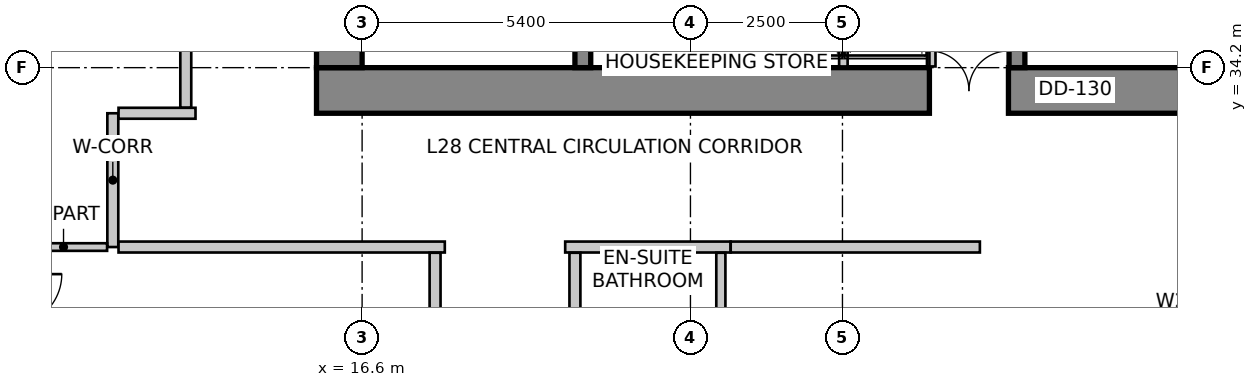
"""IFC4 building model, lengths in metres.
Left out: names, types, materials, properties, quantities, classifications, styles, units other than length and angle.
Written with IfcOpenShell. Run it as: python <this file> out.ifc"""

import sys

from ifc_helpers import new_model, si_unit, direction, frame, frame_2d, origin, place, context, subcontext, project, spatial, rectangle, extrude, source, transform, mapped, element, fill, save


model = new_model("IFC4")
c1 = context("Model", 3, precision=1e-05, world=origin(), true_north=direction((0.0, 1.0)))
c2 = subcontext(c1, "Body", "Model", "MODEL_VIEW")
j1 = project(units=[si_unit("LENGTHUNIT", "METRE"), si_unit("PLANEANGLEUNIT", "RADIAN")], contexts=[c1])
p1 = place(None, origin())
s1 = spatial("IfcSite", under=j1, at=p1, CompositionType="ELEMENT")
p2 = place(p1, origin())
s2 = spatial("IfcBuilding", under=s1, at=p2, CompositionType="ELEMENT")
p3 = place(p2, frame((0.0, 0.0, 117.8)))
s3 = spatial("IfcBuildingStorey", under=s2, at=p3, CompositionType="ELEMENT", Elevation=117.8)
p4 = place(p3, frame((15.85, 33.825, 0.0), z_axis=(0.0, 0.0, 1.0), x_axis=(1.0, 0.0, 0.0)))
e1 = element("IfcWall", 1, at=p4, inside=s3, PredefinedType="SHEAR", context=c2, shape_type="SweptSolid", body=[
    extrude(rectangle(XDim=15.9, YDim=0.75, at=frame_2d((7.95, 0.0))), origin(), (0.0, 0.0, 1.0), 3.6),
])
m1 = source(origin(), c2, "Body", "SweptSolid", [
    extrude(rectangle(XDim=1.3, YDim=2.15, at=frame_2d((0.65, 1.075))), frame((0.0, 0.385, 0.0), z_axis=(0.0, -1.0, 0.0), x_axis=(1.0, 0.0, 0.0)), (0.0, 0.0, 1.0), 0.77),
])
p5 = place(p4, frame((10.08, 0.0, 0.0)))
e2 = element("IfcOpeningElement", 2, at=p5, cuts=e1, PredefinedType="OPENING", context=c2, shape_type="MappedRepresentation", body=[
    mapped(m1, transform((0.0, 0.0, 0.0), scale=1.0)),
])
p6 = place(p3, frame((16.225, 34.2, 0.0), z_axis=(0.0, 0.0, 1.0), x_axis=(0.0, 1.0, 0.0)))
e3 = element("IfcWall", 3, at=p6, inside=s3, PredefinedType="SHEAR", context=c2, shape_type="SweptSolid", body=[
    extrude(rectangle(XDim=11.4, YDim=0.75, at=frame_2d((5.7, 0.0))), origin(), (0.0, 0.0, 1.0), 3.6),
])
m2 = source(origin(), c2, "Body", "SweptSolid", [
    extrude(rectangle(XDim=1.1, YDim=2.15, at=frame_2d((0.55, 1.075))), frame((0.0, 0.385, 0.0), z_axis=(0.0, -1.0, 0.0), x_axis=(1.0, 0.0, 0.0)), (0.0, 0.0, 1.0), 0.77),
])
p7 = place(p6, frame((7.15, 0.0, 0.0)))
e4 = element("IfcOpeningElement", 4, at=p7, cuts=e3, PredefinedType="OPENING", context=c2, shape_type="MappedRepresentation", body=[
    mapped(m2, transform((0.0, 0.0, 0.0), scale=1.0)),
])
p8 = place(p3, frame((20.23, 34.2, 0.0), z_axis=(0.0, 0.0, 1.0), x_axis=(0.0, 1.0, 0.0)))
e5 = element("IfcWall", 5, at=p8, inside=s3, PredefinedType="SHEAR", context=c2, shape_type="SweptSolid", body=[
    extrude(rectangle(XDim=9.06, YDim=0.26, at=frame_2d((4.53, 0.0))), origin(), (0.0, 0.0, 1.0), 3.6),
])
m3 = source(origin(), c2, "Body", "SweptSolid", [
    extrude(rectangle(XDim=1.1, YDim=2.15, at=frame_2d((0.55, 1.075))), frame((0.0, 0.14, 0.0), z_axis=(0.0, -1.0, 0.0), x_axis=(1.0, 0.0, 0.0)), (0.0, 0.0, 1.0), 0.28),
])
p9 = place(p8, frame((7.45, 0.0, 0.0)))
e6 = element("IfcOpeningElement", 6, at=p9, cuts=e5, PredefinedType="OPENING", context=c2, shape_type="MappedRepresentation", body=[
    mapped(m3, transform((0.0, 0.0, 0.0), scale=1.0)),
])
p10 = place(p3, frame((27.37, 34.2, 0.0), z_axis=(0.0, 0.0, 1.0), x_axis=(0.0, 1.0, 0.0)))
e7 = element("IfcWall", 7, at=p10, inside=s3, PredefinedType="SHEAR", context=c2, shape_type="SweptSolid", body=[
    extrude(rectangle(XDim=9.06, YDim=0.26, at=frame_2d((4.53, 0.0))), origin(), (0.0, 0.0, 1.0), 3.6),
])
p11 = place(p10, frame((7.45, 0.0, 0.0)))
e8 = element("IfcOpeningElement", 8, at=p11, cuts=e7, PredefinedType="OPENING", context=c2, shape_type="MappedRepresentation", body=[
    mapped(m3, transform((0.0, 0.0, 0.0), scale=1.0)),
])
p12 = place(p3, frame((28.884, 28.792, 0.0), z_axis=(0.0, 0.0, 1.0), x_axis=(0.707064797706, 0.707148762175, 0.0)))
e9 = element("IfcWall", 9, at=p12, inside=s3, PredefinedType="SOLIDWALL", context=c2, shape_type="SweptSolid", body=[
    extrude(rectangle(XDim=2.908, YDim=0.3, at=frame_2d((1.454, 0.0))), origin(), (0.0, 0.0, 1.0), 3.35),
])
m4 = source(origin(), c2, "Body", "SweptSolid", [
    extrude(rectangle(XDim=1.8, YDim=2.1, at=frame_2d((0.9, 1.05))), frame((0.0, 0.16, 0.0), z_axis=(0.0, -1.0, 0.0), x_axis=(1.0, 0.0, 0.0)), (0.0, 0.0, 1.0), 0.32),
])
p13 = place(p12, frame((0.554, 0.0, 0.85)))
e10 = element("IfcOpeningElement", 10, at=p13, cuts=e9, PredefinedType="OPENING", context=c2, shape_type="MappedRepresentation", body=[
    mapped(m4, transform((0.0, 0.0, 0.0), scale=1.0)),
])
p14 = place(p3, frame((13.269, 47.134, 0.0), z_axis=(0.0, 0.0, 1.0), x_axis=(-0.319929596295, -0.947441319246, 0.0)))
e11 = element("IfcWall", 11, at=p14, inside=s3, PredefinedType="SOLIDWALL", context=c2, shape_type="SweptSolid", body=[
    extrude(rectangle(XDim=16.134, YDim=0.3, at=frame_2d((8.067, 0.0))), origin(), (0.0, 0.0, 1.0), 3.35),
])
m5 = source(origin(), c2, "Body", "SweptSolid", [
    extrude(rectangle(XDim=2.4, YDim=2.2, at=frame_2d((1.2, 1.1))), frame((0.0, 0.16, 0.0), z_axis=(0.0, -1.0, 0.0), x_axis=(1.0, 0.0, 0.0)), (0.0, 0.0, 1.0), 0.32),
])
p15 = place(p14, frame((2.276, 0.0, 0.85)))
e12 = element("IfcOpeningElement", 12, at=p15, cuts=e11, PredefinedType="OPENING", context=c2, shape_type="MappedRepresentation", body=[
    mapped(m5, transform((0.0, 0.0, 0.0), scale=1.0)),
])
m6 = source(origin(), c2, "Body", "SweptSolid", [
    extrude(rectangle(XDim=2.1, YDim=2.0, at=frame_2d((1.05, 1.0))), frame((0.0, 0.16, 0.0), z_axis=(0.0, -1.0, 0.0), x_axis=(1.0, 0.0, 0.0)), (0.0, 0.0, 1.0), 0.32),
])
p16 = place(p14, frame((7.361, 0.0, 0.85)))
e13 = element("IfcOpeningElement", 13, at=p16, cuts=e11, PredefinedType="OPENING", context=c2, shape_type="MappedRepresentation", body=[
    mapped(m6, transform((0.0, 0.0, 0.0), scale=1.0)),
])
p17 = place(p14, frame((12.147, 0.0, 0.85)))
e14 = element("IfcOpeningElement", 14, at=p17, cuts=e11, PredefinedType="OPENING", context=c2, shape_type="MappedRepresentation", body=[
    mapped(m5, transform((0.0, 0.0, 0.0), scale=1.0)),
])
p18 = place(p3, frame((8.185, 31.834, 0.0), z_axis=(0.0, 0.0, 1.0), x_axis=(0.189707113148, -0.981840725994, 0.0)))
e15 = element("IfcWall", 15, at=p18, inside=s3, PredefinedType="SOLIDWALL", context=c2, shape_type="SweptSolid", body=[
    extrude(rectangle(XDim=21.221, YDim=0.3, at=frame_2d((10.611, 0.0))), origin(), (0.0, 0.0, 1.0), 3.35),
])
m7 = source(origin(), c2, "Body", "SweptSolid", [
    extrude(rectangle(XDim=1.6, YDim=2.15, at=frame_2d((0.8, 1.075))), frame((0.0, 0.16, 0.0), z_axis=(0.0, -1.0, 0.0), x_axis=(1.0, 0.0, 0.0)), (0.0, 0.0, 1.0), 0.32),
])
p19 = place(p18, frame((8.441, 0.0, 0.0)))
e16 = element("IfcOpeningElement", 16, at=p19, cuts=e15, PredefinedType="OPENING", context=c2, shape_type="MappedRepresentation", body=[
    mapped(m7, transform((0.0, 0.0, 0.0), scale=1.0)),
])
m8 = source(origin(), c2, "Body", "SweptSolid", [
    extrude(rectangle(XDim=1.2, YDim=1.6, at=frame_2d((0.6, 0.8))), frame((0.0, 0.16, 0.0), z_axis=(0.0, -1.0, 0.0), x_axis=(1.0, 0.0, 0.0)), (0.0, 0.0, 1.0), 0.32),
])
p20 = place(p18, frame((1.127, 0.0, 0.85)))
e17 = element("IfcOpeningElement", 17, at=p20, cuts=e15, PredefinedType="OPENING", context=c2, shape_type="MappedRepresentation", body=[
    mapped(m8, transform((0.0, 0.0, 0.0), scale=1.0)),
])
p21 = place(p18, frame((4.369, 0.0, 0.85)))
e18 = element("IfcOpeningElement", 18, at=p21, cuts=e15, PredefinedType="OPENING", context=c2, shape_type="MappedRepresentation", body=[
    mapped(m6, transform((0.0, 0.0, 0.0), scale=1.0)),
])
p22 = place(p18, frame((12.021, 0.0, 0.85)))
e19 = element("IfcOpeningElement", 19, at=p22, cuts=e15, PredefinedType="OPENING", context=c2, shape_type="MappedRepresentation", body=[
    mapped(m6, transform((0.0, 0.0, 0.0), scale=1.0)),
])
p23 = place(p18, frame((17.091, 0.0, 0.85)))
e20 = element("IfcOpeningElement", 20, at=p23, cuts=e15, PredefinedType="OPENING", context=c2, shape_type="MappedRepresentation", body=[
    mapped(m5, transform((0.0, 0.0, 0.0), scale=1.0)),
])
for number, where, z_axis, x_axis in (
    (21, (25.96, 34.22, 0.0), (0.0, 0.0, 1.0), (0.0, 1.0, 0.0)),
    (22, (23.07, 34.22, 0.0), (0.0, 0.0, 1.0), (0.0, 1.0, 0.0)),
    (23, (24.515, 34.22, 0.0), (0.0, 0.0, 1.0), (0.0, 1.0, 0.0)),
):
    element("IfcWall", number, at=place(p3, frame(where, z_axis=z_axis, x_axis=x_axis)), inside=s3, PredefinedType="SOLIDWALL", context=c2, shape_type="SweptSolid", body=[
        extrude(rectangle(XDim=1.62, YDim=0.14, at=frame_2d((0.81, 0.0))), origin(), (0.0, 0.0, 1.0), 2.642),
    ])
p24 = place(p3, frame((12.5, 31.25, 0.0), z_axis=(0.0, 0.0, 1.0), x_axis=(0.0, 1.0, 0.0)))
e24 = element("IfcWall", 24, at=p24, inside=s3, PredefinedType="PARTITIONING", context=c2, shape_type="SweptSolid", body=[
    extrude(rectangle(XDim=2.2, YDim=0.18, at=frame_2d((1.1, 0.0))), origin(), (0.0, 0.0, 1.0), 3.019),
])
p25 = place(p3, frame((12.594, 33.45, 0.0), z_axis=(0.0, 0.0, 1.0), x_axis=(1.0, 0.0, 0.0)))
e25 = element("IfcWall", 25, at=p25, inside=s3, PredefinedType="PARTITIONING", context=c2, shape_type="SweptSolid", body=[
    extrude(rectangle(XDim=1.266, YDim=0.18, at=frame_2d((0.633, 0.0))), origin(), (0.0, 0.0, 1.0), 3.35),
])
p26 = place(p3, frame((17.96, 31.25, 0.0), z_axis=(0.0, 0.0, 1.0), x_axis=(-1.0, 0.0, 0.0)))
e26 = element("IfcWall", 26, at=p26, inside=s3, PredefinedType="PARTITIONING", context=c2, shape_type="SweptSolid", body=[
    extrude(rectangle(XDim=5.366, YDim=0.18, at=frame_2d((2.683, 0.0))), origin(), (0.0, 0.0, 1.0), 3.019),
])
p27 = place(p3, frame((22.66, 31.25, 0.0), z_axis=(0.0, 0.0, 1.0), x_axis=(-1.0, 0.0, 0.0)))
e27 = element("IfcWall", 27, at=p27, inside=s3, PredefinedType="PARTITIONING", context=c2, shape_type="SweptSolid", body=[
    extrude(rectangle(XDim=2.72, YDim=0.18, at=frame_2d((1.36, 0.0))), origin(), (0.0, 0.0, 1.0), 3.019),
])
p28 = place(p3, frame((26.76, 31.25, 0.0), z_axis=(0.0, 0.0, 1.0), x_axis=(-1.0, 0.0, 0.0)))
e28 = element("IfcWall", 28, at=p28, inside=s3, PredefinedType="PARTITIONING", context=c2, shape_type="SweptSolid", body=[
    extrude(rectangle(XDim=4.098, YDim=0.18, at=frame_2d((2.049, 0.0))), origin(), (0.0, 0.0, 1.0), 3.35),
])
p29 = place(p3, frame((13.7, 33.544, 0.0), z_axis=(0.0, 0.0, 1.0), x_axis=(0.0, 1.0, 0.0)))
e29 = element("IfcWall", 29, at=p29, inside=s3, PredefinedType="PARTITIONING", context=c2, shape_type="SweptSolid", body=[
    extrude(rectangle(XDim=13.86, YDim=0.18, at=frame_2d((6.93, 0.0))), origin(), (0.0, 0.0, 1.0), 2.492),
])
m9 = source(origin(), c2, "Body", "SweptSolid", [
    extrude(rectangle(XDim=0.9, YDim=2.15, at=frame_2d((0.45, 1.075))), frame((0.0, 0.1, 0.0), z_axis=(0.0, -1.0, 0.0), x_axis=(1.0, 0.0, 0.0)), (0.0, 0.0, 1.0), 0.2),
])
p30 = place(p29, frame((4.253, 0.0, 0.0)))
e30 = element("IfcOpeningElement", 30, at=p30, cuts=e29, PredefinedType="OPENING", context=c2, shape_type="MappedRepresentation", body=[
    mapped(m9, transform((0.0, 0.0, 0.0), scale=1.0)),
])
p31 = place(p3, frame((12.406, 31.25, 0.0), z_axis=(0.0, 0.0, 1.0), x_axis=(-1.0, 0.0, 0.0)))
e31 = element("IfcWall", 31, at=p31, inside=s3, PredefinedType="PARTITIONING", context=c2, shape_type="SweptSolid", body=[
    extrude(rectangle(XDim=1.433, YDim=0.125, at=frame_2d((0.717, 0.0))), origin(), (0.0, 0.0, 1.0), 2.492),
])
p32 = place(p3, frame((17.8, 24.162, 0.0), z_axis=(0.0, 0.0, 1.0), x_axis=(0.0, 1.0, 0.0)))
e32 = element("IfcWall", 32, at=p32, inside=s3, PredefinedType="PARTITIONING", context=c2, shape_type="SweptSolid", body=[
    extrude(rectangle(XDim=6.994, YDim=0.18, at=frame_2d((3.497, 0.0))), origin(), (0.0, 0.0, 1.0), 2.803),
])
p33 = place(p32, frame((3.047, 0.0, 0.0)))
e33 = element("IfcOpeningElement", 33, at=p33, cuts=e32, PredefinedType="OPENING", context=c2, shape_type="MappedRepresentation", body=[
    mapped(m9, transform((0.0, 0.0, 0.0), scale=1.0)),
])
p34 = place(p3, frame((20.1, 31.156, 0.0), z_axis=(0.0, 0.0, 1.0), x_axis=(0.0, -1.0, 0.0)))
e34 = element("IfcWall", 34, at=p34, inside=s3, PredefinedType="PARTITIONING", context=c2, shape_type="SweptSolid", body=[
    extrude(rectangle(XDim=2.266, YDim=0.18, at=frame_2d((1.133, 0.0))), origin(), (0.0, 0.0, 1.0), 3.019),
])
p35 = place(p3, frame((22.5, 31.156, 0.0), z_axis=(0.0, 0.0, 1.0), x_axis=(0.0, -1.0, 0.0)))
e35 = element("IfcWall", 35, at=p35, inside=s3, PredefinedType="PARTITIONING", context=c2, shape_type="SweptSolid", body=[
    extrude(rectangle(XDim=2.027, YDim=0.15, at=frame_2d((1.014, 0.0))), origin(), (0.0, 0.0, 1.0), 3.019),
])
m10 = source(origin(), c2, "Body", "SweptSolid", [
    extrude(rectangle(XDim=1.8, YDim=2.1, at=frame_2d((0.9, 1.05))), frame((0.0, -0.015, 0.0), z_axis=(0.0, -1.0, 0.0), x_axis=(1.0, 0.0, 0.0)), (0.0, 0.0, 1.0), 0.06),
])
p36 = place(p13, origin())
e36 = element("IfcWindow", 36, at=p36, inside=s3, PartitioningType="SINGLE_PANEL", PredefinedType="WINDOW", context=c2, shape_type="MappedRepresentation", body=[
    mapped(m10, transform((0.0, 0.0, 0.0), scale=1.0)),
])
fill(e10, e36)
m11 = source(origin(), c2, "Body", "SweptSolid", [
    extrude(rectangle(XDim=1.3, YDim=2.15, at=frame_2d((0.65, 1.075))), frame((0.0, 0.025, 0.0), z_axis=(0.0, -1.0, 0.0), x_axis=(1.0, 0.0, 0.0)), (0.0, 0.0, 1.0), 0.05),
])
p37 = place(p5, origin())
e37 = element("IfcDoor", 37, at=p37, inside=s3, OperationType="DOUBLE_DOOR_SINGLE_SWING", PredefinedType="DOOR", context=c2, shape_type="MappedRepresentation", body=[
    mapped(m11, transform((0.0, 0.0, 0.0), scale=1.0)),
])
fill(e2, e37)
save(model, sys.argv[1])
